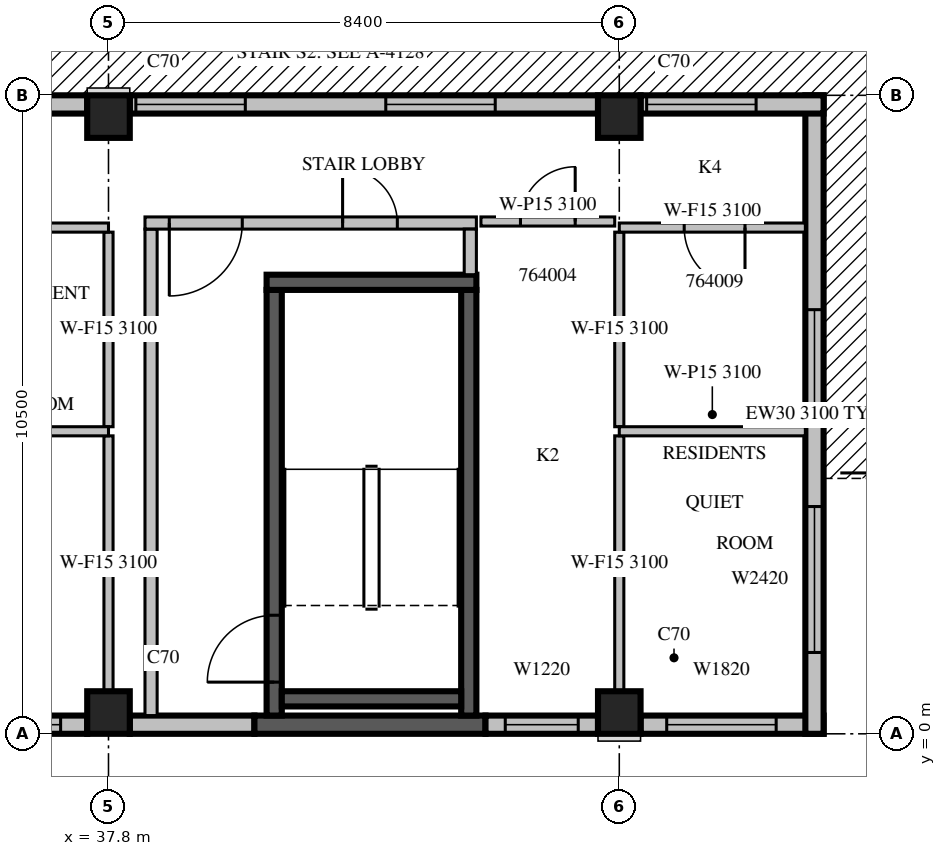
"""IFC4 building model, lengths in metres.
Left out: names, types, materials, properties, quantities, classifications, styles, units other than length and angle.
Written with IfcOpenShell. Run it as: python <this file> out.ifc"""

import sys

from ifc_helpers import new_model, si_unit, direction, frame, frame_2d, origin, origin_2d, place, context, subcontext, project, spatial, rectangle, extrude, source, transform, mapped, element, fill, save


model = new_model("IFC4")
c1 = context("Model", 3, precision=1e-05, world=origin(), true_north=direction((0.0, 1.0)))
c2 = subcontext(c1, "Body", "Model", "MODEL_VIEW")
j1 = project(units=[si_unit("LENGTHUNIT", "METRE"), si_unit("PLANEANGLEUNIT", "RADIAN")], contexts=[c1])
p1 = place(None, origin())
s1 = spatial("IfcSite", under=j1, at=p1, CompositionType="ELEMENT")
p2 = place(p1, origin())
s2 = spatial("IfcBuilding", under=s1, at=p2, CompositionType="ELEMENT")
p3 = place(p2, frame((0.0, 0.0, 284.5)))
s3 = spatial("IfcBuildingStorey", under=s2, at=p3, CompositionType="ELEMENT", Elevation=284.5)
m1 = source(origin(), c2, "Body", "SweptSolid", [
    extrude(rectangle(XDim=0.7, YDim=0.7, at=origin_2d()), origin(), (0.0, 0.0, 1.0), 3.5),
])
for number, where, z_axis, x_axis in (
    (1, (37.8, 0.35, 0.0), (0.0, 0.0, 1.0), (1.0, 0.0, 0.0)),
    (2, (46.2, 0.35, 0.0), (0.0, 0.0, 1.0), (1.0, 0.0, 0.0)),
    (3, (37.8, 10.15, 0.0), (0.0, 0.0, 1.0), (1.0, 0.0, 0.0)),
    (4, (46.2, 10.15, 0.0), (0.0, 0.0, 1.0), (1.0, 0.0, 0.0)),
):
    element("IfcColumn", number, at=place(p3, frame(where, z_axis=z_axis, x_axis=x_axis)), inside=s3, PredefinedType="COLUMN", context=c2, shape_type="MappedRepresentation", body=[
        mapped(m1, transform((0.0, 0.0, 0.0), scale=1.0)),
    ])
m2 = source(origin(), c2, "Body", "SweptSolid", [
    extrude(rectangle(XDim=7.7, YDim=0.3, at=frame_2d((3.85, 0.0))), origin(), (0.0, 0.0, 1.0), 3.1),
])
p4 = place(p3, frame((29.75, 0.15, 0.0), z_axis=(0.0, 0.0, 1.0), x_axis=(1.0, 0.0, 0.0)))
e5 = element("IfcWall", 5, at=p4, inside=s3, PredefinedType="STANDARD", context=c2, shape_type="MappedRepresentation", body=[
    mapped(m2, transform((0.0, 0.0, 0.0), scale=1.0)),
])
p5 = place(p4, frame((0.537, 0.0, 0.6)))
e6 = element("IfcOpeningElement", 6, at=p5, cuts=e5, PredefinedType="OPENING", context=c2, shape_type="SweptSolid", body=[
    extrude(rectangle(XDim=1.2, YDim=2.0, at=frame_2d((0.6, 1.0))), frame((0.0, 0.16, 0.0), z_axis=(0.0, -1.0, 0.0), x_axis=(1.0, 0.0, 0.0)), (0.0, 0.0, 1.0), 0.32),
])
m3 = source(origin(), c2, "Body", "SweptSolid", [
    extrude(rectangle(XDim=1.2, YDim=2.0, at=frame_2d((0.6, 1.0))), frame((0.0, 0.16, 0.0), z_axis=(0.0, -1.0, 0.0), x_axis=(1.0, 0.0, 0.0)), (0.0, 0.0, 1.0), 0.32),
])
p6 = place(p4, frame((6.062, 0.0, 0.6)))
e7 = element("IfcOpeningElement", 7, at=p6, cuts=e5, PredefinedType="OPENING", context=c2, shape_type="MappedRepresentation", body=[
    mapped(m3, transform((0.0, 0.0, 0.0), scale=1.0)),
])
p7 = place(p4, frame((2.7, 0.0, 0.6)))
e8 = element("IfcOpeningElement", 8, at=p7, cuts=e5, PredefinedType="OPENING", context=c2, shape_type="SweptSolid", body=[
    extrude(rectangle(XDim=2.4, YDim=2.0, at=frame_2d((1.2, 1.0))), frame((0.0, 0.16, 0.0), z_axis=(0.0, -1.0, 0.0), x_axis=(1.0, 0.0, 0.0)), (0.0, 0.0, 1.0), 0.32),
])
p8 = place(p3, frame((38.15, 0.15, 0.0), z_axis=(0.0, 0.0, 1.0), x_axis=(1.0, 0.0, 0.0)))
e9 = element("IfcWall", 9, at=p8, inside=s3, PredefinedType="STANDARD", context=c2, shape_type="SweptSolid", body=[
    extrude(rectangle(XDim=2.05, YDim=0.3, at=frame_2d((1.025, 0.0))), origin(), (0.0, 0.0, 1.0), 3.1),
])
p9 = place(p3, frame((40.2, 0.15, 0.0), z_axis=(0.0, 0.0, 1.0), x_axis=(1.0, 0.0, 0.0)))
e10 = element("IfcWall", 10, at=p9, inside=s3, PredefinedType="SOLIDWALL", context=c2, shape_type="SweptSolid", body=[
    extrude(rectangle(XDim=3.8, YDim=0.3, at=frame_2d((1.9, 0.0))), origin(), (0.0, 0.0, 1.0), 3.1),
])
p10 = place(p3, frame((44.0, 0.15, 0.0), z_axis=(0.0, 0.0, 1.0), x_axis=(1.0, 0.0, 0.0)))
e11 = element("IfcWall", 11, at=p10, inside=s3, PredefinedType="STANDARD", context=c2, shape_type="SweptSolid", body=[
    extrude(rectangle(XDim=1.85, YDim=0.3, at=frame_2d((0.925, 0.0))), origin(), (0.0, 0.0, 1.0), 3.1),
])
p11 = place(p10, frame((0.325, 0.0, 0.6)))
e12 = element("IfcOpeningElement", 12, at=p11, cuts=e11, PredefinedType="OPENING", context=c2, shape_type="MappedRepresentation", body=[
    mapped(m3, transform((0.0, 0.0, 0.0), scale=1.0)),
])
p12 = place(p3, frame((46.55, 0.15, 0.0), z_axis=(0.0, 0.0, 1.0), x_axis=(1.0, 0.0, 0.0)))
e13 = element("IfcWall", 13, at=p12, inside=s3, PredefinedType="STANDARD", context=c2, shape_type="SweptSolid", body=[
    extrude(rectangle(XDim=3.01, YDim=0.3, at=frame_2d((1.505, 0.0))), origin(), (0.0, 0.0, 1.0), 3.1),
])
m4 = source(origin(), c2, "Body", "SweptSolid", [
    extrude(rectangle(XDim=1.8, YDim=2.0, at=frame_2d((0.9, 1.0))), frame((0.0, 0.16, 0.0), z_axis=(0.0, -1.0, 0.0), x_axis=(1.0, 0.0, 0.0)), (0.0, 0.0, 1.0), 0.32),
])
p13 = place(p12, frame((0.43, 0.0, 0.6)))
e14 = element("IfcOpeningElement", 14, at=p13, cuts=e13, PredefinedType="OPENING", context=c2, shape_type="MappedRepresentation", body=[
    mapped(m4, transform((0.0, 0.0, 0.0), scale=1.0)),
])
p14 = place(p3, frame((49.41, 0.0, 0.0), z_axis=(0.0, 0.0, 1.0), x_axis=(0.0, 1.0, 0.0)))
e15 = element("IfcWall", 15, at=p14, inside=s3, PredefinedType="STANDARD", context=c2, shape_type="SweptSolid", body=[
    extrude(rectangle(XDim=10.5, YDim=0.3, at=frame_2d((5.25, 0.0))), origin(), (0.0, 0.0, 1.0), 3.1),
])
m5 = source(origin(), c2, "Body", "SweptSolid", [
    extrude(rectangle(XDim=1.8, YDim=2.4, at=frame_2d((0.9, 1.2))), frame((0.0, 0.16, 0.0), z_axis=(0.0, -1.0, 0.0), x_axis=(1.0, 0.0, 0.0)), (0.0, 0.0, 1.0), 0.32),
])
p15 = place(p14, frame((5.175, 0.0, 0.0)))
e16 = element("IfcOpeningElement", 16, at=p15, cuts=e15, PredefinedType="OPENING", context=c2, shape_type="MappedRepresentation", body=[
    mapped(m5, transform((0.0, 0.0, 0.0), scale=1.0)),
])
m6 = source(origin(), c2, "Body", "SweptSolid", [
    extrude(rectangle(XDim=2.4, YDim=2.0, at=frame_2d((1.2, 1.0))), frame((0.0, 0.16, 0.0), z_axis=(0.0, -1.0, 0.0), x_axis=(1.0, 0.0, 0.0)), (0.0, 0.0, 1.0), 0.32),
])
p16 = place(p14, frame((1.337, 0.0, 0.6)))
e17 = element("IfcOpeningElement", 17, at=p16, cuts=e15, PredefinedType="OPENING", context=c2, shape_type="MappedRepresentation", body=[
    mapped(m6, transform((0.0, 0.0, 0.0), scale=1.0)),
])
m7 = source(origin(), c2, "Body", "SweptSolid", [
    extrude(rectangle(XDim=3.01, YDim=0.3, at=frame_2d((1.505, 0.0))), origin(), (0.0, 0.0, 1.0), 3.1),
])
p17 = place(p3, frame((49.56, 10.35, 0.0), z_axis=(0.0, 0.0, 1.0), x_axis=(-1.0, 0.0, 0.0)))
e18 = element("IfcWall", 18, at=p17, inside=s3, PredefinedType="STANDARD", context=c2, shape_type="MappedRepresentation", body=[
    mapped(m7, transform((0.0, 0.0, 0.0), scale=1.0)),
])
p18 = place(p17, frame((1.11, 0.0, 0.0)))
e19 = element("IfcOpeningElement", 19, at=p18, cuts=e18, PredefinedType="OPENING", context=c2, shape_type="MappedRepresentation", body=[
    mapped(m5, transform((0.0, 0.0, 0.0), scale=1.0)),
])
p19 = place(p3, frame((45.85, 10.35, 0.0), z_axis=(0.0, 0.0, 1.0), x_axis=(-1.0, 0.0, 0.0)))
e20 = element("IfcWall", 20, at=p19, inside=s3, PredefinedType="STANDARD", context=c2, shape_type="MappedRepresentation", body=[
    mapped(m2, transform((0.0, 0.0, 0.0), scale=1.0)),
])
p20 = place(p19, frame((1.69, 0.0, 0.0)))
e21 = element("IfcOpeningElement", 21, at=p20, cuts=e20, PredefinedType="OPENING", context=c2, shape_type="MappedRepresentation", body=[
    mapped(m5, transform((0.0, 0.0, 0.0), scale=1.0)),
])
p21 = place(p19, frame((5.8, 0.0, 0.0)))
e22 = element("IfcOpeningElement", 22, at=p21, cuts=e20, PredefinedType="OPENING", context=c2, shape_type="MappedRepresentation", body=[
    mapped(m5, transform((0.0, 0.0, 0.0), scale=1.0)),
])
p22 = place(p3, frame((37.45, 10.35, 0.0), z_axis=(0.0, 0.0, 1.0), x_axis=(-1.0, 0.0, 0.0)))
e23 = element("IfcWall", 23, at=p22, inside=s3, PredefinedType="STANDARD", context=c2, shape_type="MappedRepresentation", body=[
    mapped(m2, transform((0.0, 0.0, 0.0), scale=1.0)),
])
p23 = place(p22, frame((1.69, 0.0, 0.0)))
e24 = element("IfcOpeningElement", 24, at=p23, cuts=e23, PredefinedType="OPENING", context=c2, shape_type="MappedRepresentation", body=[
    mapped(m5, transform((0.0, 0.0, 0.0), scale=1.0)),
])
p24 = place(p22, frame((5.8, 0.0, 0.0)))
e25 = element("IfcOpeningElement", 25, at=p24, cuts=e23, PredefinedType="OPENING", context=c2, shape_type="MappedRepresentation", body=[
    mapped(m5, transform((0.0, 0.0, 0.0), scale=1.0)),
])
p25 = place(p3, frame((40.525, 0.3, 0.0), z_axis=(0.0, 0.0, 1.0), x_axis=(0.0, 1.0, 0.0)))
e26 = element("IfcWall", 26, at=p25, inside=s3, PredefinedType="SOLIDWALL", context=c2, shape_type="SweptSolid", body=[
    extrude(rectangle(XDim=7.0, YDim=0.25, at=frame_2d((3.5, 0.0))), origin(), (0.0, 0.0, 1.0), 3.1),
])
m8 = source(origin(), c2, "Body", "SweptSolid", [
    extrude(rectangle(XDim=1.1, YDim=2.1, at=frame_2d((0.55, 1.05))), frame((0.0, 0.135, 0.0), z_axis=(0.0, -1.0, 0.0), x_axis=(1.0, 0.0, 0.0)), (0.0, 0.0, 1.0), 0.27),
])
p26 = place(p25, frame((0.55, 0.0, 0.0)))
e27 = element("IfcOpeningElement", 27, at=p26, cuts=e26, PredefinedType="OPENING", context=c2, shape_type="MappedRepresentation", body=[
    mapped(m8, transform((0.0, 0.0, 0.0), scale=1.0)),
])
m9 = source(origin(), c2, "Body", "SweptSolid", [
    extrude(rectangle(XDim=7.0, YDim=0.25, at=frame_2d((3.5, 0.0))), origin(), (0.0, 0.0, 1.0), 3.1),
])
p27 = place(p3, frame((43.725, 0.3, 0.0), z_axis=(0.0, 0.0, 1.0), x_axis=(0.0, 1.0, 0.0)))
e28 = element("IfcWall", 28, at=p27, inside=s3, PredefinedType="SOLIDWALL", context=c2, shape_type="MappedRepresentation", body=[
    mapped(m9, transform((0.0, 0.0, 0.0), scale=1.0)),
])
p28 = place(p3, frame((40.4, 7.425, 0.0), z_axis=(0.0, 0.0, 1.0), x_axis=(1.0, 0.0, 0.0)))
e29 = element("IfcWall", 29, at=p28, inside=s3, PredefinedType="SOLIDWALL", context=c2, shape_type="SweptSolid", body=[
    extrude(rectangle(XDim=3.45, YDim=0.25, at=frame_2d((1.725, 0.0))), origin(), (0.0, 0.0, 1.0), 3.1),
])
p29 = place(p3, frame((40.65, 0.575, 0.0), z_axis=(0.0, 0.0, 1.0), x_axis=(1.0, 0.0, 0.0)))
e30 = element("IfcWall", 30, at=p29, inside=s3, PredefinedType="SOLIDWALL", context=c2, shape_type="SweptSolid", body=[
    extrude(rectangle(XDim=2.95, YDim=0.25, at=frame_2d((1.475, 0.0))), origin(), (0.0, 0.0, 1.0), 3.1),
])
p30 = place(p3, frame((38.5, 0.3, 0.0), z_axis=(0.0, 0.0, 1.0), x_axis=(0.0, 1.0, 0.0)))
e31 = element("IfcWall", 31, at=p30, inside=s3, PredefinedType="PARTITIONING", context=c2, shape_type="SweptSolid", body=[
    extrude(rectangle(XDim=8.0, YDim=0.2, at=frame_2d((4.0, 0.0))), origin(), (0.0, 0.0, 1.0), 3.1),
])
p31 = place(p3, frame((38.4, 8.4, 0.0), z_axis=(0.0, 0.0, 1.0), x_axis=(1.0, 0.0, 0.0)))
e32 = element("IfcWall", 32, at=p31, inside=s3, PredefinedType="PARTITIONING", context=c2, shape_type="SweptSolid", body=[
    extrude(rectangle(XDim=5.45, YDim=0.2, at=frame_2d((2.725, 0.0))), origin(), (0.0, 0.0, 1.0), 3.1),
])
m10 = source(origin(), c2, "Body", "SweptSolid", [
    extrude(rectangle(XDim=1.2, YDim=2.1, at=frame_2d((0.6, 1.05))), frame((0.0, 0.11, 0.0), z_axis=(0.0, -1.0, 0.0), x_axis=(1.0, 0.0, 0.0)), (0.0, 0.0, 1.0), 0.22),
])
p32 = place(p31, frame((0.4, 0.0, 0.0)))
e33 = element("IfcOpeningElement", 33, at=p32, cuts=e32, PredefinedType="OPENING", context=c2, shape_type="MappedRepresentation", body=[
    mapped(m10, transform((0.0, 0.0, 0.0), scale=1.0)),
])
m11 = source(origin(), c2, "Body", "SweptSolid", [
    extrude(rectangle(XDim=0.9, YDim=2.1, at=frame_2d((0.45, 1.05))), frame((0.0, 0.11, 0.0), z_axis=(0.0, -1.0, 0.0), x_axis=(1.0, 0.0, 0.0)), (0.0, 0.0, 1.0), 0.22),
])
p33 = place(p31, frame((3.25, 0.0, 0.0)))
e34 = element("IfcOpeningElement", 34, at=p33, cuts=e32, PredefinedType="OPENING", context=c2, shape_type="MappedRepresentation", body=[
    mapped(m11, transform((0.0, 0.0, 0.0), scale=1.0)),
])
p34 = place(p3, frame((43.75, 7.55, 0.0), z_axis=(0.0, 0.0, 1.0), x_axis=(0.0, 1.0, 0.0)))
e35 = element("IfcWall", 35, at=p34, inside=s3, PredefinedType="PARTITIONING", context=c2, shape_type="SweptSolid", body=[
    extrude(rectangle(XDim=0.75, YDim=0.2, at=frame_2d((0.375, 0.0))), origin(), (0.0, 0.0, 1.0), 3.1),
])
p35 = place(p3, frame((46.125, 8.425, 0.0), z_axis=(0.0, 0.0, 1.0), x_axis=(-1.0, 0.0, 0.0)))
e36 = element("IfcWall", 36, at=p35, inside=s3, PredefinedType="PARTITIONING", context=c2, shape_type="SweptSolid", body=[
    extrude(rectangle(XDim=2.2, YDim=0.15, at=frame_2d((1.1, 0.0))), origin(), (0.0, 0.0, 1.0), 3.1),
])
m12 = source(origin(), c2, "Body", "SweptSolid", [
    extrude(rectangle(XDim=0.9, YDim=2.1, at=frame_2d((0.45, 1.05))), frame((0.0, 0.085, 0.0), z_axis=(0.0, -1.0, 0.0), x_axis=(1.0, 0.0, 0.0)), (0.0, 0.0, 1.0), 0.17),
])
p36 = place(p35, frame((0.65, 0.0, 0.0)))
e37 = element("IfcOpeningElement", 37, at=p36, cuts=e36, PredefinedType="OPENING", context=c2, shape_type="MappedRepresentation", body=[
    mapped(m12, transform((0.0, 0.0, 0.0), scale=1.0)),
])
p37 = place(p3, frame((37.8, 0.699, 0.0), z_axis=(0.0, 0.0, 1.0), x_axis=(0.0, 1.0, 0.0)))
e38 = element("IfcWall", 38, at=p37, inside=s3, PredefinedType="PARTITIONING", context=c2, shape_type="SweptSolid", body=[
    extrude(rectangle(XDim=4.201, YDim=0.15, at=frame_2d((2.1, 0.0))), origin(), (0.0, 0.0, 1.0), 3.1),
])
m13 = source(origin(), c2, "Body", "SweptSolid", [
    extrude(rectangle(XDim=3.2, YDim=0.15, at=frame_2d((1.6, 0.0))), origin(), (0.0, 0.0, 1.0), 3.1),
])
p38 = place(p3, frame((37.8, 5.05, 0.0), z_axis=(0.0, 0.0, 1.0), x_axis=(0.0, 1.0, 0.0)))
e39 = element("IfcWall", 39, at=p38, inside=s3, PredefinedType="PARTITIONING", context=c2, shape_type="MappedRepresentation", body=[
    mapped(m13, transform((0.0, 0.0, 0.0), scale=1.0)),
])
p39 = place(p3, frame((37.8, 4.975, 0.0), z_axis=(0.0, 0.0, 1.0), x_axis=(-1.0, 0.0, 0.0)))
e40 = element("IfcWall", 40, at=p39, inside=s3, PredefinedType="PARTITIONING", context=c2, shape_type="SweptSolid", body=[
    extrude(rectangle(XDim=8.4, YDim=0.15, at=frame_2d((4.2, 0.0))), origin(), (0.0, 0.0, 1.0), 3.1),
])
m14 = source(origin(), c2, "Body", "SweptSolid", [
    extrude(rectangle(XDim=1.0, YDim=2.1, at=frame_2d((0.5, 1.05))), frame((0.0, 0.085, 0.0), z_axis=(0.0, -1.0, 0.0), x_axis=(1.0, 0.0, 0.0)), (0.0, 0.0, 1.0), 0.17),
])
p40 = place(p39, frame((3.608, 0.0, 0.0)))
e41 = element("IfcOpeningElement", 41, at=p40, cuts=e40, PredefinedType="OPENING", context=c2, shape_type="MappedRepresentation", body=[
    mapped(m14, transform((0.0, 0.0, 0.0), scale=1.0)),
])
m15 = source(origin(), c2, "Body", "SweptSolid", [
    extrude(rectangle(XDim=4.201, YDim=0.15, at=frame_2d((2.1, 0.0))), origin(), (0.0, 0.0, 1.0), 3.1),
])
p41 = place(p3, frame((46.2, 0.699, 0.0), z_axis=(0.0, 0.0, 1.0), x_axis=(0.0, 1.0, 0.0)))
e42 = element("IfcWall", 42, at=p41, inside=s3, PredefinedType="PARTITIONING", context=c2, shape_type="MappedRepresentation", body=[
    mapped(m15, transform((0.0, 0.0, 0.0), scale=1.0)),
])
p42 = place(p3, frame((46.2, 5.05, 0.0), z_axis=(0.0, 0.0, 1.0), x_axis=(0.0, 1.0, 0.0)))
e43 = element("IfcWall", 43, at=p42, inside=s3, PredefinedType="PARTITIONING", context=c2, shape_type="MappedRepresentation", body=[
    mapped(m13, transform((0.0, 0.0, 0.0), scale=1.0)),
])
p43 = place(p3, frame((49.26, 4.975, 0.0), z_axis=(0.0, 0.0, 1.0), x_axis=(-1.0, 0.0, 0.0)))
e44 = element("IfcWall", 44, at=p43, inside=s3, PredefinedType="PARTITIONING", context=c2, shape_type="SweptSolid", body=[
    extrude(rectangle(XDim=3.06, YDim=0.15, at=frame_2d((1.53, 0.0))), origin(), (0.0, 0.0, 1.0), 3.1),
])
m16 = source(origin(), c2, "Body", "SweptSolid", [
    extrude(rectangle(XDim=8.4, YDim=0.15, at=frame_2d((4.2, 0.0))), origin(), (0.0, 0.0, 1.0), 3.1),
])
p44 = place(p3, frame((37.8, 8.325, 0.0), z_axis=(0.0, 0.0, 1.0), x_axis=(-1.0, 0.0, 0.0)))
e45 = element("IfcWall", 45, at=p44, inside=s3, PredefinedType="PARTITIONING", context=c2, shape_type="MappedRepresentation", body=[
    mapped(m16, transform((0.0, 0.0, 0.0), scale=1.0)),
])
p45 = place(p44, frame((3.658, 0.0, 0.0)))
e46 = element("IfcOpeningElement", 46, at=p45, cuts=e45, PredefinedType="OPENING", context=c2, shape_type="MappedRepresentation", body=[
    mapped(m14, transform((0.0, 0.0, 0.0), scale=1.0)),
])
m17 = source(origin(), c2, "Body", "SweptSolid", [
    extrude(rectangle(XDim=3.06, YDim=0.15, at=frame_2d((1.53, 0.0))), origin(), (0.0, 0.0, 1.0), 3.1),
])
p46 = place(p3, frame((49.26, 8.325, 0.0), z_axis=(0.0, 0.0, 1.0), x_axis=(-1.0, 0.0, 0.0)))
e47 = element("IfcWall", 47, at=p46, inside=s3, PredefinedType="PARTITIONING", context=c2, shape_type="MappedRepresentation", body=[
    mapped(m17, transform((0.0, 0.0, 0.0), scale=1.0)),
])
p47 = place(p46, frame((0.993, 0.0, 0.0)))
e48 = element("IfcOpeningElement", 48, at=p47, cuts=e47, PredefinedType="OPENING", context=c2, shape_type="MappedRepresentation", body=[
    mapped(m14, transform((0.0, 0.0, 0.0), scale=1.0)),
])
m18 = source(origin(), c2, "Body", "SweptSolid", [
    extrude(rectangle(XDim=1.2, YDim=2.0, at=frame_2d((0.6, 1.0))), frame((0.0, 0.03, 0.0), z_axis=(0.0, -1.0, 0.0), x_axis=(1.0, 0.0, 0.0)), (0.0, 0.0, 1.0), 0.06),
])
p48 = place(p6, origin())
e49 = element("IfcWindow", 49, at=p48, inside=s3, PartitioningType="SINGLE_PANEL", PredefinedType="WINDOW", context=c2, shape_type="MappedRepresentation", body=[
    mapped(m18, transform((0.0, 0.0, 0.0), scale=1.0)),
])
fill(e7, e49)
p49 = place(p11, origin())
e50 = element("IfcWindow", 50, at=p49, inside=s3, PartitioningType="SINGLE_PANEL", PredefinedType="WINDOW", context=c2, shape_type="MappedRepresentation", body=[
    mapped(m18, transform((0.0, 0.0, 0.0), scale=1.0)),
])
fill(e12, e50)
m19 = source(origin(), c2, "Body", "SweptSolid", [
    extrude(rectangle(XDim=1.8, YDim=2.0, at=frame_2d((0.9, 1.0))), frame((0.0, 0.03, 0.0), z_axis=(0.0, -1.0, 0.0), x_axis=(1.0, 0.0, 0.0)), (0.0, 0.0, 1.0), 0.06),
])
p50 = place(p13, origin())
e51 = element("IfcWindow", 51, at=p50, inside=s3, PartitioningType="SINGLE_PANEL", PredefinedType="WINDOW", context=c2, shape_type="MappedRepresentation", body=[
    mapped(m19, transform((0.0, 0.0, 0.0), scale=1.0)),
])
fill(e14, e51)
m20 = source(origin(), c2, "Body", "SweptSolid", [
    extrude(rectangle(XDim=1.8, YDim=2.4, at=frame_2d((0.9, 1.2))), frame((0.0, 0.025, 0.0), z_axis=(0.0, -1.0, 0.0), x_axis=(1.0, 0.0, 0.0)), (0.0, 0.0, 1.0), 0.05),
])
p51 = place(p15, origin())
e52 = element("IfcDoor", 52, at=p51, inside=s3, OperationType="SLIDING_TO_LEFT", PredefinedType="DOOR", context=c2, shape_type="MappedRepresentation", body=[
    mapped(m20, transform((0.0, 0.0, 0.0), scale=1.0)),
])
fill(e16, e52)
m21 = source(origin(), c2, "Body", "SweptSolid", [
    extrude(rectangle(XDim=2.4, YDim=2.0, at=frame_2d((1.2, 1.0))), frame((0.0, 0.03, 0.0), z_axis=(0.0, -1.0, 0.0), x_axis=(1.0, 0.0, 0.0)), (0.0, 0.0, 1.0), 0.06),
])
p52 = place(p16, origin())
e53 = element("IfcWindow", 53, at=p52, inside=s3, PartitioningType="SINGLE_PANEL", PredefinedType="WINDOW", context=c2, shape_type="MappedRepresentation", body=[
    mapped(m21, transform((0.0, 0.0, 0.0), scale=1.0)),
])
fill(e17, e53)
p53 = place(p18, origin())
e54 = element("IfcDoor", 54, at=p53, inside=s3, OperationType="SLIDING_TO_LEFT", PredefinedType="DOOR", context=c2, shape_type="MappedRepresentation", body=[
    mapped(m20, transform((0.0, 0.0, 0.0), scale=1.0)),
])
fill(e19, e54)
p54 = place(p20, origin())
e55 = element("IfcDoor", 55, at=p54, inside=s3, OperationType="SLIDING_TO_LEFT", PredefinedType="DOOR", context=c2, shape_type="MappedRepresentation", body=[
    mapped(m20, transform((0.0, 0.0, 0.0), scale=1.0)),
])
fill(e21, e55)
p55 = place(p21, origin())
e56 = element("IfcDoor", 56, at=p55, inside=s3, OperationType="SLIDING_TO_LEFT", PredefinedType="DOOR", context=c2, shape_type="MappedRepresentation", body=[
    mapped(m20, transform((0.0, 0.0, 0.0), scale=1.0)),
])
fill(e22, e56)
m22 = source(origin(), c2, "Body", "SweptSolid", [
    extrude(rectangle(XDim=1.1, YDim=2.1, at=frame_2d((0.55, 1.05))), frame((0.0, 0.025, 0.0), z_axis=(0.0, -1.0, 0.0), x_axis=(1.0, 0.0, 0.0)), (0.0, 0.0, 1.0), 0.05),
])
p56 = place(p26, origin())
e57 = element("IfcDoor", 57, at=p56, inside=s3, OperationType="SINGLE_SWING_LEFT", PredefinedType="DOOR", context=c2, shape_type="MappedRepresentation", body=[
    mapped(m22, transform((0.0, 0.0, 0.0), scale=1.0)),
])
fill(e27, e57)
m23 = source(origin(), c2, "Body", "SweptSolid", [
    extrude(rectangle(XDim=1.2, YDim=2.1, at=frame_2d((0.6, 1.05))), frame((0.0, 0.025, 0.0), z_axis=(0.0, -1.0, 0.0), x_axis=(1.0, 0.0, 0.0)), (0.0, 0.0, 1.0), 0.05),
])
p57 = place(p32, origin())
e58 = element("IfcDoor", 58, at=p57, inside=s3, OperationType="SINGLE_SWING_RIGHT", PredefinedType="DOOR", context=c2, shape_type="MappedRepresentation", body=[
    mapped(m23, transform((0.0, 0.0, 0.0), scale=1.0)),
])
fill(e33, e58)
m24 = source(origin(), c2, "Body", "SweptSolid", [
    extrude(rectangle(XDim=0.9, YDim=2.1, at=frame_2d((0.45, 1.05))), frame((0.0, 0.025, 0.0), z_axis=(0.0, -1.0, 0.0), x_axis=(1.0, 0.0, 0.0)), (0.0, 0.0, 1.0), 0.05),
])
p58 = place(p33, origin())
e59 = element("IfcDoor", 59, at=p58, inside=s3, OperationType="SINGLE_SWING_LEFT", PredefinedType="DOOR", context=c2, shape_type="MappedRepresentation", body=[
    mapped(m24, transform((0.0, 0.0, 0.0), scale=1.0)),
])
fill(e34, e59)
p59 = place(p36, origin())
e60 = element("IfcDoor", 60, at=p59, inside=s3, OperationType="SINGLE_SWING_RIGHT", PredefinedType="DOOR", context=c2, shape_type="MappedRepresentation", body=[
    mapped(m24, transform((0.0, 0.0, 0.0), scale=1.0)),
])
fill(e37, e60)
m25 = source(origin(), c2, "Body", "SweptSolid", [
    extrude(rectangle(XDim=1.0, YDim=2.1, at=frame_2d((0.5, 1.05))), frame((0.0, 0.025, 0.0), z_axis=(0.0, -1.0, 0.0), x_axis=(1.0, 0.0, 0.0)), (0.0, 0.0, 1.0), 0.05),
])
p60 = place(p47, origin())
e61 = element("IfcDoor", 61, at=p60, inside=s3, OperationType="SINGLE_SWING_LEFT", PredefinedType="DOOR", context=c2, shape_type="MappedRepresentation", body=[
    mapped(m25, transform((0.0, 0.0, 0.0), scale=1.0)),
])
fill(e48, e61)
save(model, sys.argv[1])
